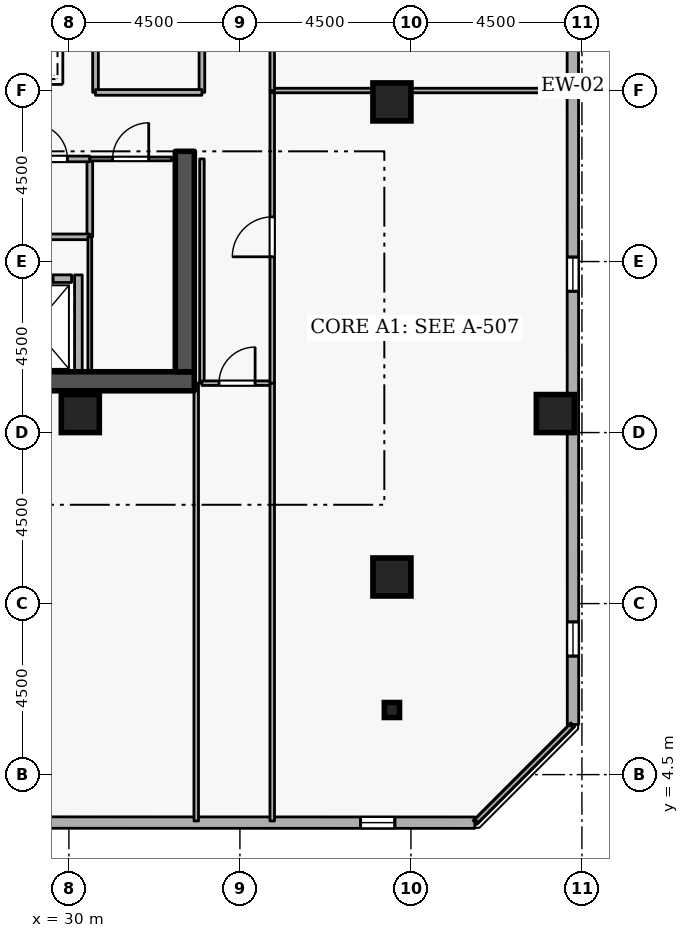
"""IFC4 building model, lengths in metres.
Left out: names, types, materials, properties, quantities, classifications, styles, units other than length and angle.
Written with IfcOpenShell. Run it as: python <this file> out.ifc"""

import sys

from ifc_helpers import new_model, si_unit, direction, frame, frame_2d, origin, origin_2d, place, context, subcontext, project, spatial, rectangle, i_section, extrude, element, fill, save


model = new_model("IFC4")
c1 = context("Model", 3, precision=1e-05, world=origin(), true_north=direction((0.0, 1.0)))
c2 = subcontext(c1, "Body", "Model", "MODEL_VIEW")
j1 = project(units=[si_unit("LENGTHUNIT", "METRE"), si_unit("PLANEANGLEUNIT", "RADIAN")], contexts=[c1])
p1 = place(None, origin())
s1 = spatial("IfcSite", under=j1, at=p1, CompositionType="ELEMENT")
p2 = place(p1, origin())
s2 = spatial("IfcBuilding", under=s1, at=p2, CompositionType="ELEMENT")
p3 = place(p2, frame((0.0, 0.0, 240.3)))
s3 = spatial("IfcBuildingStorey", under=s2, at=p3, CompositionType="ELEMENT", Elevation=240.3)
p4 = place(p3, frame((17.7, 14.85, 0.0), z_axis=(0.0, 0.0, 1.0), x_axis=(1.0, 0.0, 0.0)))
e1 = element("IfcWall", 1, at=p4, inside=s3, PredefinedType="SHEAR", context=c2, shape_type="SweptSolid", body=[
    extrude(rectangle(XDim=15.6, YDim=0.5, at=frame_2d((7.8, 0.0))), origin(), (0.0, 0.0, 1.0), 3.6),
])
p5 = place(p3, frame((33.05, 15.1, 0.0), z_axis=(0.0, 0.0, 1.0), x_axis=(0.0, 1.0, 0.0)))
e2 = element("IfcWall", 2, at=p5, inside=s3, PredefinedType="SHEAR", context=c2, shape_type="SweptSolid", body=[
    extrude(rectangle(XDim=5.8, YDim=0.5, at=frame_2d((2.9, 0.0))), origin(), (0.0, 0.0, 1.0), 3.6),
])
for number, where, z_axis, x_axis in (
    (3, (38.5, 9.7, 0.0), (0.0, 0.0, 1.0), (1.0, 0.0, 0.0)),
    (4, (42.8, 14.0, 0.0), (0.0, 0.0, 1.0), (1.0, 0.0, 0.0)),
    (5, (38.5, 22.2, 0.0), (0.0, 0.0, 1.0), (1.0, 0.0, 0.0)),
    (6, (30.3, 14.0, 0.0), (0.0, 0.0, 1.0), (1.0, 0.0, 0.0)),
):
    element("IfcColumn", number, at=place(p3, frame(where, z_axis=z_axis, x_axis=x_axis)), inside=s3, PredefinedType="COLUMN", context=c2, shape_type="SweptSolid", body=[
        extrude(rectangle(XDim=1.0, YDim=1.0, at=origin_2d()), origin(), (0.0, 0.0, 1.0), 3.6),
    ])
p6 = place(p3, frame((38.5, 6.2, 0.0), z_axis=(0.0, 0.0, 1.0), x_axis=(1.0, 0.0, 0.0)))
e7 = element("IfcColumn", 7, at=p6, inside=s3, PredefinedType="COLUMN", context=c2, shape_type="SweptSolid", body=[
    extrude(i_section(OverallWidth=0.399, OverallDepth=0.394, WebThickness=0.023, FlangeThickness=0.037, FilletRadius=0.015, at=origin_2d()), origin(), (0.0, 0.0, 1.0), 3.6),
])
p7 = place(p3, frame((7.076, 3.244, 0.0), z_axis=(0.0, 0.0, 1.0), x_axis=(0.999999963872, -0.000268805477, 0.0)))
e8 = element("IfcWall", 8, at=p7, inside=s3, PredefinedType="STANDARD", context=c2, shape_type="SweptSolid", body=[
    extrude(rectangle(XDim=33.605, YDim=0.3, at=frame_2d((16.802, 0.0))), origin(), (0.0, 0.0, 1.0), 2.7),
])
p8 = place(p7, frame((1.8, 0.0, 0.72)))
e9 = element("IfcOpeningElement", 9, at=p8, cuts=e8, PredefinedType="OPENING", context=c2, shape_type="SweptSolid", body=[
    extrude(rectangle(XDim=0.9, YDim=1.75, at=frame_2d((0.45, 0.875))), frame((0.0, 0.16, 0.0), z_axis=(0.0, -1.0, 0.0), x_axis=(1.0, 0.0, 0.0)), (0.0, 0.0, 1.0), 0.32),
])
p9 = place(p7, frame((6.6, 0.0, 0.72)))
e10 = element("IfcOpeningElement", 10, at=p9, cuts=e8, PredefinedType="OPENING", context=c2, shape_type="SweptSolid", body=[
    extrude(rectangle(XDim=0.9, YDim=1.75, at=frame_2d((0.45, 0.875))), frame((0.0, 0.16, 0.0), z_axis=(0.0, -1.0, 0.0), x_axis=(1.0, 0.0, 0.0)), (0.0, 0.0, 1.0), 0.32),
])
p10 = place(p7, frame((11.4, 0.0, 0.72)))
e11 = element("IfcOpeningElement", 11, at=p10, cuts=e8, PredefinedType="OPENING", context=c2, shape_type="SweptSolid", body=[
    extrude(rectangle(XDim=0.9, YDim=1.75, at=frame_2d((0.45, 0.875))), frame((0.0, 0.16, 0.0), z_axis=(0.0, -1.0, 0.0), x_axis=(1.0, 0.0, 0.0)), (0.0, 0.0, 1.0), 0.32),
])
p11 = place(p7, frame((16.2, 0.0, 0.72)))
e12 = element("IfcOpeningElement", 12, at=p11, cuts=e8, PredefinedType="OPENING", context=c2, shape_type="SweptSolid", body=[
    extrude(rectangle(XDim=0.9, YDim=1.75, at=frame_2d((0.45, 0.875))), frame((0.0, 0.16, 0.0), z_axis=(0.0, -1.0, 0.0), x_axis=(1.0, 0.0, 0.0)), (0.0, 0.0, 1.0), 0.32),
])
p12 = place(p7, frame((21.0, 0.0, 0.72)))
e13 = element("IfcOpeningElement", 13, at=p12, cuts=e8, PredefinedType="OPENING", context=c2, shape_type="SweptSolid", body=[
    extrude(rectangle(XDim=0.9, YDim=1.75, at=frame_2d((0.45, 0.875))), frame((0.0, 0.16, 0.0), z_axis=(0.0, -1.0, 0.0), x_axis=(1.0, 0.0, 0.0)), (0.0, 0.0, 1.0), 0.32),
])
p13 = place(p7, frame((30.6, 0.0, 0.72)))
e14 = element("IfcOpeningElement", 14, at=p13, cuts=e8, PredefinedType="OPENING", context=c2, shape_type="SweptSolid", body=[
    extrude(rectangle(XDim=0.9, YDim=1.75, at=frame_2d((0.45, 0.875))), frame((0.0, 0.16, 0.0), z_axis=(0.0, -1.0, 0.0), x_axis=(1.0, 0.0, 0.0)), (0.0, 0.0, 1.0), 0.32),
])
p14 = place(p3, frame((43.265, 5.819, 0.0), z_axis=(0.0, 0.0, 1.0), x_axis=(-0.000268805477, 0.999999963872, 0.0)))
e15 = element("IfcWall", 15, at=p14, inside=s3, PredefinedType="STANDARD", context=c2, shape_type="SweptSolid", body=[
    extrude(rectangle(XDim=33.605, YDim=0.3, at=frame_2d((16.802, 0.0))), origin(), (0.0, 0.0, 1.0), 2.7),
])
p15 = place(p14, frame((1.8, 0.0, 0.72)))
e16 = element("IfcOpeningElement", 16, at=p15, cuts=e15, PredefinedType="OPENING", context=c2, shape_type="SweptSolid", body=[
    extrude(rectangle(XDim=0.9, YDim=1.75, at=frame_2d((0.45, 0.875))), frame((0.0, 0.16, 0.0), z_axis=(0.0, -1.0, 0.0), x_axis=(1.0, 0.0, 0.0)), (0.0, 0.0, 1.0), 0.32),
])
p16 = place(p14, frame((11.4, 0.0, 0.72)))
e17 = element("IfcOpeningElement", 17, at=p16, cuts=e15, PredefinedType="OPENING", context=c2, shape_type="SweptSolid", body=[
    extrude(rectangle(XDim=0.9, YDim=1.75, at=frame_2d((0.45, 0.875))), frame((0.0, 0.16, 0.0), z_axis=(0.0, -1.0, 0.0), x_axis=(1.0, 0.0, 0.0)), (0.0, 0.0, 1.0), 0.32),
])
p17 = place(p14, frame((25.8, 0.0, 0.72)))
e18 = element("IfcOpeningElement", 18, at=p17, cuts=e15, PredefinedType="OPENING", context=c2, shape_type="SweptSolid", body=[
    extrude(rectangle(XDim=0.9, YDim=1.75, at=frame_2d((0.45, 0.875))), frame((0.0, 0.16, 0.0), z_axis=(0.0, -1.0, 0.0), x_axis=(1.0, 0.0, 0.0)), (0.0, 0.0, 1.0), 0.32),
])
p18 = place(p14, frame((30.6, 0.0, 0.72)))
e19 = element("IfcOpeningElement", 19, at=p18, cuts=e15, PredefinedType="OPENING", context=c2, shape_type="SweptSolid", body=[
    extrude(rectangle(XDim=0.9, YDim=1.75, at=frame_2d((0.45, 0.875))), frame((0.0, 0.16, 0.0), z_axis=(0.0, -1.0, 0.0), x_axis=(1.0, 0.0, 0.0)), (0.0, 0.0, 1.0), 0.32),
])
p19 = place(p3, frame((28.08, 17.55, 0.0), z_axis=(0.0, 0.0, 1.0), x_axis=(1.0, 0.0, 0.0)))
e20 = element("IfcWall", 20, at=p19, inside=s3, PredefinedType="STANDARD", context=c2, shape_type="SweptSolid", body=[
    extrude(rectangle(XDim=1.99, YDim=0.2, at=frame_2d((0.995, 0.0))), origin(), (0.0, 0.0, 1.0), 3.34),
])
p20 = place(p19, frame((0.485, 0.0, 0.0)))
e21 = element("IfcOpeningElement", 21, at=p20, cuts=e20, PredefinedType="OPENING", context=c2, shape_type="SweptSolid", body=[
    extrude(rectangle(XDim=1.02, YDim=2.06, at=frame_2d((0.51, 1.03))), frame((0.0, 0.11, 0.0), z_axis=(0.0, -1.0, 0.0), x_axis=(1.0, 0.0, 0.0)), (0.0, 0.0, 1.0), 0.22),
])
p21 = place(p3, frame((30.25, 15.112, 0.0), z_axis=(0.0, 0.0, 1.0), x_axis=(0.0, 1.0, 0.0)))
e22 = element("IfcWall", 22, at=p21, inside=s3, PredefinedType="STANDARD", context=c2, shape_type="SweptSolid", body=[
    extrude(rectangle(XDim=2.536, YDim=0.2, at=frame_2d((1.268, 0.0))), origin(), (0.0, 0.0, 1.0), 3.34),
])
p22 = place(p3, frame((30.55, 20.7, 0.0), z_axis=(0.0, 0.0, 1.0), x_axis=(0.0, -1.0, 0.0)))
e23 = element("IfcWall", 23, at=p22, inside=s3, PredefinedType="PARTITIONING", context=c2, shape_type="SweptSolid", body=[
    extrude(rectangle(XDim=2.05, YDim=0.15, at=frame_2d((1.025, 0.0))), origin(), (0.0, 0.0, 1.0), 3.34),
])
p23 = place(p3, frame((30.55, 18.65, 0.0), z_axis=(0.0, 0.0, 1.0), x_axis=(-1.0, 0.0, 0.0)))
e24 = element("IfcWall", 24, at=p23, inside=s3, PredefinedType="PARTITIONING", context=c2, shape_type="SweptSolid", body=[
    extrude(rectangle(XDim=2.1, YDim=0.15, at=frame_2d((1.05, 0.0))), origin(), (0.0, 0.0, 1.0), 3.34),
])
p24 = place(p3, frame((28.45, 20.7, 0.0), z_axis=(0.0, 0.0, 1.0), x_axis=(1.0, 0.0, 0.0)))
e25 = element("IfcWall", 25, at=p24, inside=s3, PredefinedType="PARTITIONING", context=c2, shape_type="SweptSolid", body=[
    extrude(rectangle(XDim=2.1, YDim=0.15, at=frame_2d((1.05, 0.0))), origin(), (0.0, 0.0, 1.0), 3.34),
])
p25 = place(p24, frame((0.59, 0.0, 0.0)))
e26 = element("IfcOpeningElement", 26, at=p25, cuts=e25, PredefinedType="OPENING", context=c2, shape_type="SweptSolid", body=[
    extrude(rectangle(XDim=0.92, YDim=2.08, at=frame_2d((0.46, 1.04))), frame((0.0, 0.085, 0.0), z_axis=(0.0, -1.0, 0.0), x_axis=(1.0, 0.0, 0.0)), (0.0, 0.0, 1.0), 0.17),
])
p26 = place(p3, frame((30.55, 15.1, 0.0), z_axis=(0.0, 0.0, 1.0), x_axis=(0.0, 1.0, 0.0)))
e27 = element("IfcWall", 27, at=p26, inside=s3, PredefinedType="PARTITIONING", context=c2, shape_type="SweptSolid", body=[
    extrude(rectangle(XDim=3.55, YDim=0.1, at=frame_2d((1.775, 0.0))), origin(), (0.0, 0.0, 1.0), 3.34),
])
p27 = place(p3, frame((30.55, 20.7, 0.0), z_axis=(0.0, 0.0, 1.0), x_axis=(1.0, 0.0, 0.0)))
e28 = element("IfcWall", 28, at=p27, inside=s3, PredefinedType="PARTITIONING", context=c2, shape_type="SweptSolid", body=[
    extrude(rectangle(XDim=2.15, YDim=0.1, at=frame_2d((1.075, 0.0))), origin(), (0.0, 0.0, 1.0), 3.34),
])
p28 = place(p27, frame((0.6, 0.0, 0.0)))
e29 = element("IfcOpeningElement", 29, at=p28, cuts=e28, PredefinedType="OPENING", context=c2, shape_type="SweptSolid", body=[
    extrude(rectangle(XDim=0.95, YDim=2.1, at=frame_2d((0.475, 1.05))), frame((0.0, 0.06, 0.0), z_axis=(0.0, -1.0, 0.0), x_axis=(1.0, 0.0, 0.0)), (0.0, 0.0, 1.0), 0.12),
])
p29 = place(p3, frame((33.5, 20.7, 0.0), z_axis=(0.0, 0.0, 1.0), x_axis=(0.0, -1.0, 0.0)))
e30 = element("IfcWall", 30, at=p29, inside=s3, PredefinedType="PARTITIONING", context=c2, shape_type="SweptSolid", body=[
    extrude(rectangle(XDim=5.9, YDim=0.12, at=frame_2d((2.95, 0.0))), origin(), (0.0, 0.0, 1.0), 3.34),
])
p30 = place(p3, frame((33.5, 14.8, 0.0), z_axis=(0.0, 0.0, 1.0), x_axis=(1.0, 0.0, 0.0)))
e31 = element("IfcWall", 31, at=p30, inside=s3, PredefinedType="PARTITIONING", context=c2, shape_type="SweptSolid", body=[
    extrude(rectangle(XDim=1.85, YDim=0.12, at=frame_2d((0.925, 0.0))), origin(), (0.0, 0.0, 1.0), 3.34),
])
p31 = place(p30, frame((0.45, 0.0, 0.0)))
e32 = element("IfcOpeningElement", 32, at=p31, cuts=e31, PredefinedType="OPENING", context=c2, shape_type="SweptSolid", body=[
    extrude(rectangle(XDim=0.95, YDim=2.1, at=frame_2d((0.475, 1.05))), frame((0.0, 0.07, 0.0), z_axis=(0.0, -1.0, 0.0), x_axis=(1.0, 0.0, 0.0)), (0.0, 0.0, 1.0), 0.14),
])
for number, where, z_axis, x_axis in (
    (33, (35.35, 14.8, 0.0), (0.0, 0.0, 1.0), (0.0, -1.0, 0.0)),
    (34, (33.35, 3.28, 0.0), (0.0, 0.0, 1.0), (0.0, 1.0, 0.0)),
):
    element("IfcWall", number, at=place(p3, frame(where, z_axis=z_axis, x_axis=x_axis)), inside=s3, PredefinedType="PARTITIONING", context=c2, shape_type="SweptSolid", body=[
        extrude(rectangle(XDim=11.52, YDim=0.12, at=frame_2d((5.76, 0.0))), origin(), (0.0, 0.0, 1.0), 3.34),
    ])
p32 = place(p3, frame((35.35, 14.8, 0.0), z_axis=(0.0, 0.0, 1.0), x_axis=(0.0, 1.0, 0.0)))
e35 = element("IfcWall", 35, at=p32, inside=s3, PredefinedType="PARTITIONING", context=c2, shape_type="SweptSolid", body=[
    extrude(rectangle(XDim=7.7, YDim=0.12, at=frame_2d((3.85, 0.0))), origin(), (0.0, 0.0, 1.0), 3.34),
])
p33 = place(p32, frame((3.325, 0.0, 0.0)))
e36 = element("IfcOpeningElement", 36, at=p33, cuts=e35, PredefinedType="OPENING", context=c2, shape_type="SweptSolid", body=[
    extrude(rectangle(XDim=1.05, YDim=2.1, at=frame_2d((0.525, 1.05))), frame((0.0, 0.07, 0.0), z_axis=(0.0, -1.0, 0.0), x_axis=(1.0, 0.0, 0.0)), (0.0, 0.0, 1.0), 0.14),
])
p34 = place(p3, frame((35.35, 22.5, 0.0), z_axis=(0.0, 0.0, 1.0), x_axis=(1.0, 0.0, 0.0)))
e37 = element("IfcWall", 37, at=p34, inside=s3, PredefinedType="PARTITIONING", context=c2, shape_type="SweptSolid", body=[
    extrude(rectangle(XDim=7.87, YDim=0.12, at=frame_2d((3.935, 0.0))), origin(), (0.0, 0.0, 1.0), 3.34),
])
p35 = place(p3, frame((43.22, 5.775, 0.0), z_axis=(0.0, 0.0, 1.0), x_axis=(-0.707106781187, -0.707106781187, 0.0)))
e38 = element("IfcWall", 38, at=p35, inside=s3, PredefinedType="PARTITIONING", context=c2, shape_type="SweptSolid", body=[
    extrude(rectangle(XDim=3.528, YDim=0.12, at=frame_2d((1.764, 0.0))), origin(), (0.0, 0.0, 1.0), 3.34),
])
p36 = place(p3, frame((35.35, 22.5, 0.0), z_axis=(0.0, 0.0, 1.0), x_axis=(0.0, 1.0, 0.0)))
e39 = element("IfcWall", 39, at=p36, inside=s3, PredefinedType="PARTITIONING", context=c2, shape_type="SweptSolid", body=[
    extrude(rectangle(XDim=6.3, YDim=0.12, at=frame_2d((3.15, 0.0))), origin(), (0.0, 0.0, 1.0), 3.34),
])
p37 = place(p36, frame((2.675, 0.0, 0.0)))
e40 = element("IfcOpeningElement", 40, at=p37, cuts=e39, PredefinedType="OPENING", context=c2, shape_type="SweptSolid", body=[
    extrude(rectangle(XDim=0.95, YDim=2.1, at=frame_2d((0.475, 1.05))), frame((0.0, 0.07, 0.0), z_axis=(0.0, -1.0, 0.0), x_axis=(1.0, 0.0, 0.0)), (0.0, 0.0, 1.0), 0.14),
])
p38 = place(p3, frame((30.7, 22.45, 0.0), z_axis=(0.0, 0.0, 1.0), x_axis=(0.0, 1.0, 0.0)))
e41 = element("IfcWall", 41, at=p38, inside=s3, PredefinedType="PARTITIONING", context=c2, shape_type="SweptSolid", body=[
    extrude(rectangle(XDim=4.55, YDim=0.15, at=frame_2d((2.275, 0.0))), origin(), (0.0, 0.0, 1.0), 3.34),
])
p39 = place(p3, frame((33.5, 27.0, 0.0), z_axis=(0.0, 0.0, 1.0), x_axis=(0.0, -1.0, 0.0)))
e42 = element("IfcWall", 42, at=p39, inside=s3, PredefinedType="PARTITIONING", context=c2, shape_type="SweptSolid", body=[
    extrude(rectangle(XDim=4.55, YDim=0.15, at=frame_2d((2.275, 0.0))), origin(), (0.0, 0.0, 1.0), 3.34),
])
p40 = place(p39, frame((1.625, 0.0, 0.0)))
e43 = element("IfcOpeningElement", 43, at=p40, cuts=e42, PredefinedType="OPENING", context=c2, shape_type="SweptSolid", body=[
    extrude(rectangle(XDim=1.3, YDim=2.12, at=frame_2d((0.65, 1.06))), frame((0.0, 0.085, 0.0), z_axis=(0.0, -1.0, 0.0), x_axis=(1.0, 0.0, 0.0)), (0.0, 0.0, 1.0), 0.17),
])
p41 = place(p3, frame((33.5, 22.45, 0.0), z_axis=(0.0, 0.0, 1.0), x_axis=(-1.0, 0.0, 0.0)))
e44 = element("IfcWall", 44, at=p41, inside=s3, PredefinedType="PARTITIONING", context=c2, shape_type="SweptSolid", body=[
    extrude(rectangle(XDim=2.8, YDim=0.15, at=frame_2d((1.4, 0.0))), origin(), (0.0, 0.0, 1.0), 3.34),
])
p42 = place(p13, origin())
e45 = element("IfcWindow", 45, at=p42, inside=s3, PartitioningType="SINGLE_PANEL", PredefinedType="WINDOW", context=c2, shape_type="SweptSolid", body=[
    extrude(rectangle(XDim=0.9, YDim=1.75, at=frame_2d((0.45, 0.875))), frame((0.0, 0.03, 0.0), z_axis=(0.0, -1.0, 0.0), x_axis=(1.0, 0.0, 0.0)), (0.0, 0.0, 1.0), 0.06),
])
fill(e14, e45)
p43 = place(p15, origin())
e46 = element("IfcWindow", 46, at=p43, inside=s3, PartitioningType="SINGLE_PANEL", PredefinedType="WINDOW", context=c2, shape_type="SweptSolid", body=[
    extrude(rectangle(XDim=0.9, YDim=1.75, at=frame_2d((0.45, 0.875))), frame((0.0, 0.03, 0.0), z_axis=(0.0, -1.0, 0.0), x_axis=(1.0, 0.0, 0.0)), (0.0, 0.0, 1.0), 0.06),
])
fill(e16, e46)
p44 = place(p16, origin())
e47 = element("IfcWindow", 47, at=p44, inside=s3, PartitioningType="SINGLE_PANEL", PredefinedType="WINDOW", context=c2, shape_type="SweptSolid", body=[
    extrude(rectangle(XDim=0.9, YDim=1.75, at=frame_2d((0.45, 0.875))), frame((0.0, 0.03, 0.0), z_axis=(0.0, -1.0, 0.0), x_axis=(1.0, 0.0, 0.0)), (0.0, 0.0, 1.0), 0.06),
])
fill(e17, e47)
p45 = place(p20, origin())
e48 = element("IfcDoor", 48, at=p45, inside=s3, OperationType="SLIDING_TO_LEFT", PredefinedType="DOOR", context=c2, shape_type="SweptSolid", body=[
    extrude(rectangle(XDim=1.02, YDim=2.06, at=frame_2d((0.51, 1.03))), frame((0.0, 0.025, 0.0), z_axis=(0.0, -1.0, 0.0), x_axis=(1.0, 0.0, 0.0)), (0.0, 0.0, 1.0), 0.05),
])
fill(e21, e48)
p46 = place(p25, origin())
e49 = element("IfcDoor", 49, at=p46, inside=s3, OperationType="SINGLE_SWING_LEFT", PredefinedType="DOOR", context=c2, shape_type="SweptSolid", body=[
    extrude(rectangle(XDim=0.92, YDim=2.08, at=frame_2d((0.46, 1.04))), frame((0.0, 0.025, 0.0), z_axis=(0.0, -1.0, 0.0), x_axis=(1.0, 0.0, 0.0)), (0.0, 0.0, 1.0), 0.05),
])
fill(e26, e49)
p47 = place(p28, origin())
e50 = element("IfcDoor", 50, at=p47, inside=s3, OperationType="SINGLE_SWING_RIGHT", PredefinedType="DOOR", context=c2, shape_type="SweptSolid", body=[
    extrude(rectangle(XDim=0.95, YDim=2.1, at=frame_2d((0.475, 1.05))), frame((0.0, 0.025, 0.0), z_axis=(0.0, -1.0, 0.0), x_axis=(1.0, 0.0, 0.0)), (0.0, 0.0, 1.0), 0.05),
])
fill(e29, e50)
p48 = place(p31, origin())
e51 = element("IfcDoor", 51, at=p48, inside=s3, OperationType="SINGLE_SWING_RIGHT", PredefinedType="DOOR", context=c2, shape_type="SweptSolid", body=[
    extrude(rectangle(XDim=0.95, YDim=2.1, at=frame_2d((0.475, 1.05))), frame((0.0, 0.025, 0.0), z_axis=(0.0, -1.0, 0.0), x_axis=(1.0, 0.0, 0.0)), (0.0, 0.0, 1.0), 0.05),
])
fill(e32, e51)
p49 = place(p33, origin())
e52 = element("IfcDoor", 52, at=p49, inside=s3, OperationType="SINGLE_SWING_LEFT", PredefinedType="DOOR", context=c2, shape_type="SweptSolid", body=[
    extrude(rectangle(XDim=1.05, YDim=2.1, at=frame_2d((0.525, 1.05))), frame((0.0, 0.025, 0.0), z_axis=(0.0, -1.0, 0.0), x_axis=(1.0, 0.0, 0.0)), (0.0, 0.0, 1.0), 0.05),
])
fill(e36, e52)
save(model, sys.argv[1])
